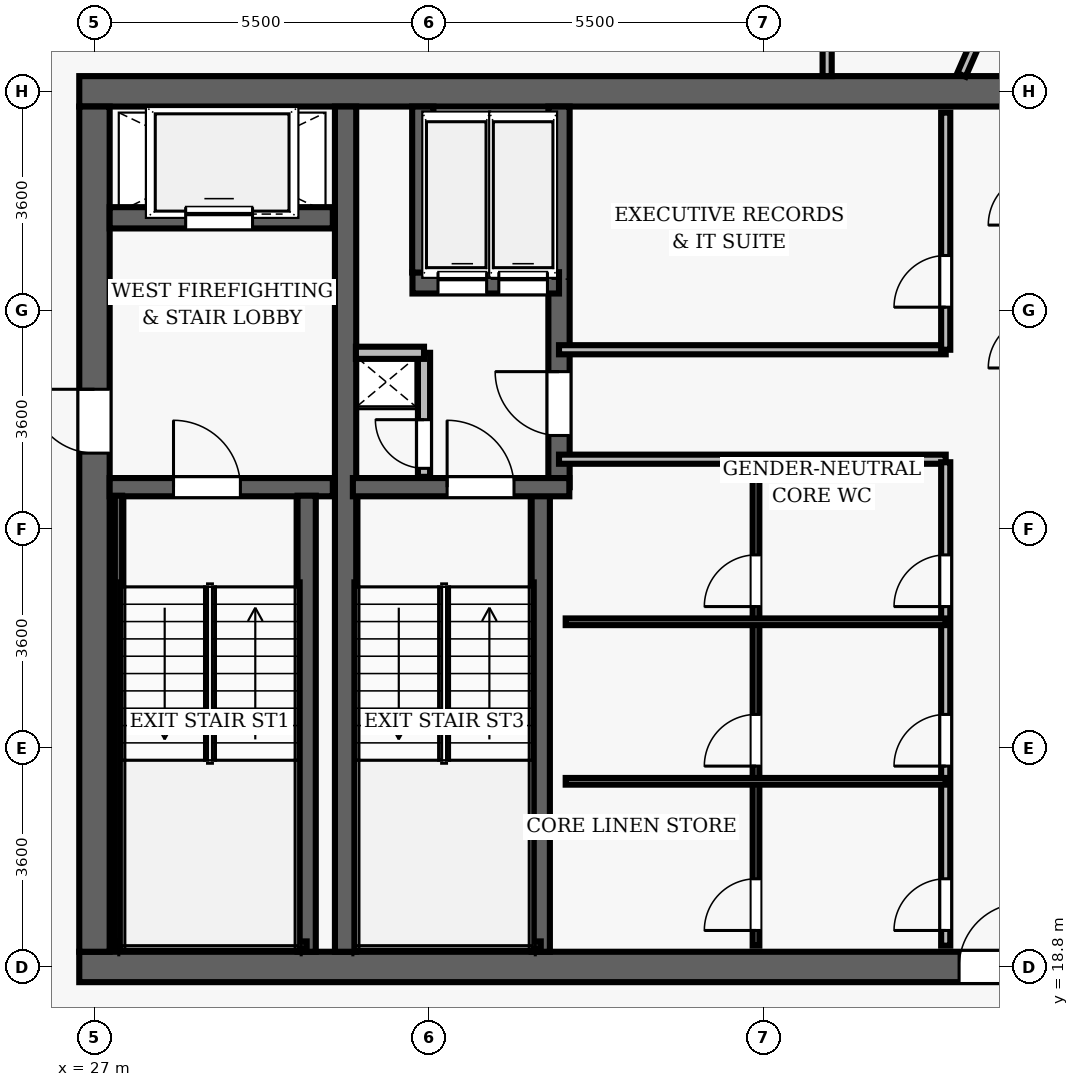
"""IFC4 building model, lengths in metres.
Left out: names, types, materials, properties, quantities, classifications, styles, units other than length and angle.
Written with IfcOpenShell. Run it as: python <this file> out.ifc"""

import sys

from ifc_helpers import new_model, si_unit, direction, frame, frame_2d, origin, place, context, subcontext, project, spatial, rectangle, extrude, element, fill, save


model = new_model("IFC4")
c1 = context("Model", 3, precision=1e-05, world=origin(), true_north=direction((0.0, 1.0)))
c2 = subcontext(c1, "Body", "Model", "MODEL_VIEW")
j1 = project(units=[si_unit("LENGTHUNIT", "METRE"), si_unit("PLANEANGLEUNIT", "RADIAN")], contexts=[c1])
p1 = place(None, origin())
s1 = spatial("IfcSite", under=j1, at=p1, CompositionType="ELEMENT")
p2 = place(p1, origin())
s2 = spatial("IfcBuilding", under=s1, at=p2, CompositionType="ELEMENT")
p3 = place(p2, frame((0.0, 0.0, 269.0)))
s3 = spatial("IfcBuildingStorey", under=s2, at=p3, CompositionType="ELEMENT", Elevation=269.0)
p4 = place(p3, frame((26.75, 18.8, 0.0), z_axis=(0.0, 0.0, 1.0), x_axis=(1.0, 0.0, 0.0)))
e1 = element("IfcWall", 1, at=p4, inside=s3, PredefinedType="SHEAR", context=c2, shape_type="SweptSolid", body=[
    extrude(rectangle(XDim=22.5, YDim=0.5, at=frame_2d((11.25, 0.0))), origin(), (0.0, 0.0, 1.0), 3.85),
])
p5 = place(p4, frame((14.47, 0.0, 0.0)))
e2 = element("IfcOpeningElement", 2, at=p5, cuts=e1, PredefinedType="OPENING", context=c2, shape_type="SweptSolid", body=[
    extrude(rectangle(XDim=1.05, YDim=2.15, at=frame_2d((0.525, 1.075))), frame((0.0, 0.26, 0.0), z_axis=(0.0, -1.0, 0.0), x_axis=(1.0, 0.0, 0.0)), (0.0, 0.0, 1.0), 0.52),
])
p6 = place(p3, frame((26.75, 33.2, 0.0), z_axis=(0.0, 0.0, 1.0), x_axis=(1.0, 0.0, 0.0)))
e3 = element("IfcWall", 3, at=p6, inside=s3, PredefinedType="SHEAR", context=c2, shape_type="SweptSolid", body=[
    extrude(rectangle(XDim=22.5, YDim=0.5, at=frame_2d((11.25, 0.0))), origin(), (0.0, 0.0, 1.0), 3.85),
])
p7 = place(p3, frame((27.0, 19.05, 0.0), z_axis=(0.0, 0.0, 1.0), x_axis=(0.0, 1.0, 0.0)))
e4 = element("IfcWall", 4, at=p7, inside=s3, PredefinedType="SHEAR", context=c2, shape_type="SweptSolid", body=[
    extrude(rectangle(XDim=13.9, YDim=0.5, at=frame_2d((6.95, 0.0))), origin(), (0.0, 0.0, 1.0), 3.85),
])
p8 = place(p7, frame((8.2, 0.0, 0.0)))
e5 = element("IfcOpeningElement", 5, at=p8, cuts=e4, PredefinedType="OPENING", context=c2, shape_type="SweptSolid", body=[
    extrude(rectangle(XDim=1.05, YDim=2.15, at=frame_2d((0.525, 1.075))), frame((0.0, 0.26, 0.0), z_axis=(0.0, -1.0, 0.0), x_axis=(1.0, 0.0, 0.0)), (0.0, 0.0, 1.0), 0.52),
])
p9 = place(p3, frame((31.13, 19.05, 0.0), z_axis=(0.0, 0.0, 1.0), x_axis=(0.0, 1.0, 0.0)))
e6 = element("IfcWall", 6, at=p9, inside=s3, PredefinedType="SHEAR", context=c2, shape_type="SweptSolid", body=[
    extrude(rectangle(XDim=13.9, YDim=0.35, at=frame_2d((6.95, 0.0))), origin(), (0.0, 0.0, 1.0), 3.85),
])
p10 = place(p3, frame((27.25, 26.69, 0.0), z_axis=(0.0, 0.0, 1.0), x_axis=(1.0, 0.0, 0.0)))
e7 = element("IfcWall", 7, at=p10, inside=s3, PredefinedType="SHEAR", context=c2, shape_type="SweptSolid", body=[
    extrude(rectangle(XDim=3.67, YDim=0.3, at=frame_2d((1.835, 0.0))), origin(), (0.0, 0.0, 1.0), 3.85),
])
p11 = place(p10, frame((1.05, 0.0, 0.0)))
e8 = element("IfcOpeningElement", 8, at=p11, cuts=e7, PredefinedType="OPENING", context=c2, shape_type="SweptSolid", body=[
    extrude(rectangle(XDim=1.1, YDim=2.15, at=frame_2d((0.55, 1.075))), frame((0.0, 0.16, 0.0), z_axis=(0.0, -1.0, 0.0), x_axis=(1.0, 0.0, 0.0)), (0.0, 0.0, 1.0), 0.32),
])
p12 = place(p3, frame((30.49, 19.05, 0.0), z_axis=(0.0, 0.0, 1.0), x_axis=(0.0, 1.0, 0.0)))
e9 = element("IfcWall", 9, at=p12, inside=s3, PredefinedType="SHEAR", context=c2, shape_type="SweptSolid", body=[
    extrude(rectangle(XDim=7.5, YDim=0.3, at=frame_2d((3.75, 0.0))), origin(), (0.0, 0.0, 1.0), 3.85),
])
p13 = place(p3, frame((27.395, 19.1, 0.0), z_axis=(0.0, 0.0, 1.0), x_axis=(0.0, 1.0, 0.0)))
e10 = element("IfcWall", 10, at=p13, inside=s3, PredefinedType="SHEAR", context=c2, shape_type="SweptSolid", body=[
    extrude(rectangle(XDim=7.45, YDim=0.12, at=frame_2d((3.725, 0.0))), origin(), (0.0, 0.0, 1.0), 3.85),
])
p14 = place(p3, frame((27.395, 19.16, 0.0), z_axis=(0.0, 0.0, 1.0), x_axis=(1.0, 0.0, 0.0)))
e11 = element("IfcWall", 11, at=p14, inside=s3, PredefinedType="SHEAR", context=c2, shape_type="SweptSolid", body=[
    extrude(rectangle(XDim=3.095, YDim=0.12, at=frame_2d((1.547, 0.0))), origin(), (0.0, 0.0, 1.0), 3.85),
])
p15 = place(p3, frame((27.25, 31.12, 0.0), z_axis=(0.0, 0.0, 1.0), x_axis=(1.0, 0.0, 0.0)))
e12 = element("IfcWall", 12, at=p15, inside=s3, PredefinedType="SHEAR", context=c2, shape_type="SweptSolid", body=[
    extrude(rectangle(XDim=3.67, YDim=0.35, at=frame_2d((1.835, 0.0))), origin(), (0.0, 0.0, 1.0), 3.04),
])
p16 = place(p15, frame((1.25, 0.0, 0.0)))
e13 = element("IfcOpeningElement", 13, at=p16, cuts=e12, PredefinedType="OPENING", context=c2, shape_type="SweptSolid", body=[
    extrude(rectangle(XDim=1.1, YDim=2.15, at=frame_2d((0.55, 1.075))), frame((0.0, 0.185, 0.0), z_axis=(0.0, -1.0, 0.0), x_axis=(1.0, 0.0, 0.0)), (0.0, 0.0, 1.0), 0.37),
])
p17 = place(p3, frame((34.34, 19.05, 0.0), z_axis=(0.0, 0.0, 1.0), x_axis=(0.0, 1.0, 0.0)))
e14 = element("IfcWall", 14, at=p17, inside=s3, PredefinedType="SHEAR", context=c2, shape_type="SweptSolid", body=[
    extrude(rectangle(XDim=7.5, YDim=0.3, at=frame_2d((3.75, 0.0))), origin(), (0.0, 0.0, 1.0), 3.85),
])
p18 = place(p3, frame((34.64, 26.69, 0.0), z_axis=(0.0, 0.0, 1.0), x_axis=(0.0, 1.0, 0.0)))
e15 = element("IfcWall", 15, at=p18, inside=s3, PredefinedType="SHEAR", context=c2, shape_type="SweptSolid", body=[
    extrude(rectangle(XDim=6.26, YDim=0.35, at=frame_2d((3.13, 0.0))), origin(), (0.0, 0.0, 1.0), 3.85),
])
p19 = place(p18, frame((0.85, 0.0, 0.0)))
e16 = element("IfcOpeningElement", 16, at=p19, cuts=e15, PredefinedType="OPENING", context=c2, shape_type="SweptSolid", body=[
    extrude(rectangle(XDim=1.05, YDim=2.15, at=frame_2d((0.525, 1.075))), frame((0.0, 0.185, 0.0), z_axis=(0.0, -1.0, 0.0), x_axis=(1.0, 0.0, 0.0)), (0.0, 0.0, 1.0), 0.37),
])
p20 = place(p3, frame((31.25, 26.69, 0.0), z_axis=(0.0, 0.0, 1.0), x_axis=(1.0, 0.0, 0.0)))
e17 = element("IfcWall", 17, at=p20, inside=s3, PredefinedType="SHEAR", context=c2, shape_type="SweptSolid", body=[
    extrude(rectangle(XDim=3.56, YDim=0.3, at=frame_2d((1.78, 0.0))), origin(), (0.0, 0.0, 1.0), 3.85),
])
p21 = place(p20, frame((1.55, 0.0, 0.0)))
e18 = element("IfcOpeningElement", 18, at=p21, cuts=e17, PredefinedType="OPENING", context=c2, shape_type="SweptSolid", body=[
    extrude(rectangle(XDim=1.1, YDim=2.15, at=frame_2d((0.55, 1.075))), frame((0.0, 0.16, 0.0), z_axis=(0.0, -1.0, 0.0), x_axis=(1.0, 0.0, 0.0)), (0.0, 0.0, 1.0), 0.32),
])
p22 = place(p3, frame((31.3, 19.16, 0.0), z_axis=(0.0, 0.0, 1.0), x_axis=(1.0, 0.0, 0.0)))
e19 = element("IfcWall", 19, at=p22, inside=s3, PredefinedType="SHEAR", context=c2, shape_type="SweptSolid", body=[
    extrude(rectangle(XDim=3.04, YDim=0.12, at=frame_2d((1.52, 0.0))), origin(), (0.0, 0.0, 1.0), 3.85),
])
p23 = place(p3, frame((32.23, 30.05, 0.0), z_axis=(0.0, 0.0, 1.0), x_axis=(1.0, 0.0, 0.0)))
e20 = element("IfcWall", 20, at=p23, inside=s3, PredefinedType="SHEAR", context=c2, shape_type="SweptSolid", body=[
    extrude(rectangle(XDim=2.41, YDim=0.35, at=frame_2d((1.205, 0.0))), origin(), (0.0, 0.0, 1.0), 3.04),
])
p24 = place(p23, frame((0.42, 0.0, 0.0)))
e21 = element("IfcOpeningElement", 21, at=p24, cuts=e20, PredefinedType="OPENING", context=c2, shape_type="SweptSolid", body=[
    extrude(rectangle(XDim=0.8, YDim=2.15, at=frame_2d((0.4, 1.075))), frame((0.0, 0.185, 0.0), z_axis=(0.0, -1.0, 0.0), x_axis=(1.0, 0.0, 0.0)), (0.0, 0.0, 1.0), 0.37),
])
p25 = place(p23, frame((1.42, 0.0, 0.0)))
e22 = element("IfcOpeningElement", 22, at=p25, cuts=e20, PredefinedType="OPENING", context=c2, shape_type="SweptSolid", body=[
    extrude(rectangle(XDim=0.8, YDim=2.15, at=frame_2d((0.4, 1.075))), frame((0.0, 0.185, 0.0), z_axis=(0.0, -1.0, 0.0), x_axis=(1.0, 0.0, 0.0)), (0.0, 0.0, 1.0), 0.37),
])
p26 = place(p3, frame((32.4, 30.22, 0.0), z_axis=(0.0, 0.0, 1.0), x_axis=(0.0, 1.0, 0.0)))
e23 = element("IfcWall", 23, at=p26, inside=s3, PredefinedType="SHEAR", context=c2, shape_type="SweptSolid", body=[
    extrude(rectangle(XDim=2.73, YDim=0.35, at=frame_2d((1.365, 0.0))), origin(), (0.0, 0.0, 1.0), 3.04),
])
p27 = place(p3, frame((32.42, 26.86, 0.0), z_axis=(0.0, 0.0, 1.0), x_axis=(0.0, 1.0, 0.0)))
e24 = element("IfcWall", 24, at=p27, inside=s3, PredefinedType="PARTITIONING", context=c2, shape_type="SweptSolid", body=[
    extrude(rectangle(XDim=2.04, YDim=0.2, at=frame_2d((1.02, 0.0))), origin(), (0.0, 0.0, 1.0), 3.04),
])
p28 = place(p27, frame((0.14, 0.0, 0.0)))
e25 = element("IfcOpeningElement", 25, at=p28, cuts=e24, PredefinedType="OPENING", context=c2, shape_type="SweptSolid", body=[
    extrude(rectangle(XDim=0.8, YDim=2.05, at=frame_2d((0.4, 1.025))), frame((0.0, 0.11, 0.0), z_axis=(0.0, -1.0, 0.0), x_axis=(1.0, 0.0, 0.0)), (0.0, 0.0, 1.0), 0.22),
])
p29 = place(p3, frame((31.3, 28.9, 0.0), z_axis=(0.0, 0.0, 1.0), x_axis=(1.0, 0.0, 0.0)))
e26 = element("IfcWall", 26, at=p29, inside=s3, PredefinedType="PARTITIONING", context=c2, shape_type="SweptSolid", body=[
    extrude(rectangle(XDim=1.12, YDim=0.2, at=frame_2d((0.56, 0.0))), origin(), (0.0, 0.0, 1.0), 3.04),
])
for number, where, z_axis, x_axis in (
    (27, (34.64, 27.15, 0.0), (0.0, 0.0, 1.0), (1.0, 0.0, 0.0)),
    (28, (34.64, 28.95, 0.0), (0.0, 0.0, 1.0), (1.0, 0.0, 0.0)),
):
    element("IfcWall", number, at=place(p3, frame(where, z_axis=z_axis, x_axis=x_axis)), inside=s3, PredefinedType="PARTITIONING", context=c2, shape_type="SweptSolid", body=[
        extrude(rectangle(XDim=6.36, YDim=0.15, at=frame_2d((3.18, 0.0))), origin(), (0.0, 0.0, 1.0), 3.04),
    ])
p30 = place(p3, frame((41.0, 28.95, 0.0), z_axis=(0.0, 0.0, 1.0), x_axis=(0.0, 1.0, 0.0)))
e29 = element("IfcWall", 29, at=p30, inside=s3, PredefinedType="PARTITIONING", context=c2, shape_type="SweptSolid", body=[
    extrude(rectangle(XDim=3.9, YDim=0.15, at=frame_2d((1.95, 0.0))), origin(), (0.0, 0.0, 1.0), 3.04),
])
p31 = place(p30, frame((0.7, 0.0, 0.0)))
e30 = element("IfcOpeningElement", 30, at=p31, cuts=e29, PredefinedType="OPENING", context=c2, shape_type="SweptSolid", body=[
    extrude(rectangle(XDim=0.85, YDim=2.1, at=frame_2d((0.425, 1.05))), frame((0.0, 0.085, 0.0), z_axis=(0.0, -1.0, 0.0), x_axis=(1.0, 0.0, 0.0)), (0.0, 0.0, 1.0), 0.17),
])
p32 = place(p3, frame((41.0, 19.15, 0.0), z_axis=(0.0, 0.0, 1.0), x_axis=(0.0, 1.0, 0.0)))
e31 = element("IfcWall", 31, at=p32, inside=s3, PredefinedType="PARTITIONING", context=c2, shape_type="SweptSolid", body=[
    extrude(rectangle(XDim=7.95, YDim=0.15, at=frame_2d((3.975, 0.0))), origin(), (0.0, 0.0, 1.0), 3.04),
])
p33 = place(p32, frame((0.25, 0.0, 0.0)))
e32 = element("IfcOpeningElement", 32, at=p33, cuts=e31, PredefinedType="OPENING", context=c2, shape_type="SweptSolid", body=[
    extrude(rectangle(XDim=0.85, YDim=2.1, at=frame_2d((0.425, 1.05))), frame((0.0, 0.085, 0.0), z_axis=(0.0, -1.0, 0.0), x_axis=(1.0, 0.0, 0.0)), (0.0, 0.0, 1.0), 0.17),
])
p34 = place(p32, frame((2.953, 0.0, 0.0)))
e33 = element("IfcOpeningElement", 33, at=p34, cuts=e31, PredefinedType="OPENING", context=c2, shape_type="SweptSolid", body=[
    extrude(rectangle(XDim=0.85, YDim=2.1, at=frame_2d((0.425, 1.05))), frame((0.0, 0.085, 0.0), z_axis=(0.0, -1.0, 0.0), x_axis=(1.0, 0.0, 0.0)), (0.0, 0.0, 1.0), 0.17),
])
p35 = place(p32, frame((5.576, 0.0, 0.0)))
e34 = element("IfcOpeningElement", 34, at=p35, cuts=e31, PredefinedType="OPENING", context=c2, shape_type="SweptSolid", body=[
    extrude(rectangle(XDim=0.85, YDim=2.1, at=frame_2d((0.425, 1.05))), frame((0.0, 0.085, 0.0), z_axis=(0.0, -1.0, 0.0), x_axis=(1.0, 0.0, 0.0)), (0.0, 0.0, 1.0), 0.17),
])
p36 = place(p3, frame((37.88, 19.15, 0.0), z_axis=(0.0, 0.0, 1.0), x_axis=(0.0, 1.0, 0.0)))
e35 = element("IfcWall", 35, at=p36, inside=s3, PredefinedType="PARTITIONING", context=c2, shape_type="SweptSolid", body=[
    extrude(rectangle(XDim=7.95, YDim=0.11, at=frame_2d((3.975, 0.0))), origin(), (0.0, 0.0, 1.0), 3.04),
])
p37 = place(p36, frame((0.25, 0.0, 0.0)))
e36 = element("IfcOpeningElement", 36, at=p37, cuts=e35, PredefinedType="OPENING", context=c2, shape_type="SweptSolid", body=[
    extrude(rectangle(XDim=0.85, YDim=2.1, at=frame_2d((0.425, 1.05))), frame((0.0, 0.065, 0.0), z_axis=(0.0, -1.0, 0.0), x_axis=(1.0, 0.0, 0.0)), (0.0, 0.0, 1.0), 0.13),
])
p38 = place(p36, frame((2.953, 0.0, 0.0)))
e37 = element("IfcOpeningElement", 37, at=p38, cuts=e35, PredefinedType="OPENING", context=c2, shape_type="SweptSolid", body=[
    extrude(rectangle(XDim=0.85, YDim=2.1, at=frame_2d((0.425, 1.05))), frame((0.0, 0.065, 0.0), z_axis=(0.0, -1.0, 0.0), x_axis=(1.0, 0.0, 0.0)), (0.0, 0.0, 1.0), 0.13),
])
p39 = place(p36, frame((5.576, 0.0, 0.0)))
e38 = element("IfcOpeningElement", 38, at=p39, cuts=e35, PredefinedType="OPENING", context=c2, shape_type="SweptSolid", body=[
    extrude(rectangle(XDim=0.85, YDim=2.1, at=frame_2d((0.425, 1.05))), frame((0.0, 0.065, 0.0), z_axis=(0.0, -1.0, 0.0), x_axis=(1.0, 0.0, 0.0)), (0.0, 0.0, 1.0), 0.13),
])
for number, where, z_axis, x_axis in (
    (39, (34.75, 21.853, 0.0), (0.0, 0.0, 1.0), (1.0, 0.0, 0.0)),
    (40, (34.75, 24.477, 0.0), (0.0, 0.0, 1.0), (1.0, 0.0, 0.0)),
):
    element("IfcWall", number, at=place(p3, frame(where, z_axis=z_axis, x_axis=x_axis)), inside=s3, PredefinedType="PARTITIONING", context=c2, shape_type="SweptSolid", body=[
        extrude(rectangle(XDim=6.25, YDim=0.11, at=frame_2d((3.125, 0.0))), origin(), (0.0, 0.0, 1.0), 3.04),
    ])
p40 = place(p3, frame((39.05, 33.45, 0.0), z_axis=(0.0, 0.0, 1.0), x_axis=(0.0, 1.0, 0.0)))
e41 = element("IfcWall", 41, at=p40, inside=s3, PredefinedType="PARTITIONING", context=c2, shape_type="SweptSolid", body=[
    extrude(rectangle(XDim=6.95, YDim=0.15, at=frame_2d((3.475, 0.0))), origin(), (0.0, 0.0, 1.0), 3.04),
])
p41 = place(p40, frame((0.988, 0.0, 0.0)))
e42 = element("IfcOpeningElement", 42, at=p41, cuts=e41, PredefinedType="OPENING", context=c2, shape_type="SweptSolid", body=[
    extrude(rectangle(XDim=1.5, YDim=2.2, at=frame_2d((0.75, 1.1))), frame((0.0, 0.085, 0.0), z_axis=(0.0, -1.0, 0.0), x_axis=(1.0, 0.0, 0.0)), (0.0, 0.0, 1.0), 0.17),
])
p42 = place(p3, frame((41.259, 33.47, 0.0), z_axis=(0.0, 0.0, 1.0), x_axis=(0.399896869604, 0.916560141879, 0.0)))
e43 = element("IfcWall", 43, at=p42, inside=s3, PredefinedType="PARTITIONING", context=c2, shape_type="SweptSolid", body=[
    extrude(rectangle(XDim=12.616, YDim=0.15, at=frame_2d((6.308, 0.0))), origin(), (0.0, 0.0, 1.0), 3.04),
])
p43 = place(p11, origin())
e44 = element("IfcDoor", 44, at=p43, inside=s3, OperationType="SINGLE_SWING_LEFT", PredefinedType="DOOR", context=c2, shape_type="SweptSolid", body=[
    extrude(rectangle(XDim=1.1, YDim=2.15, at=frame_2d((0.55, 1.075))), frame((0.0, 0.025, 0.0), z_axis=(0.0, -1.0, 0.0), x_axis=(1.0, 0.0, 0.0)), (0.0, 0.0, 1.0), 0.05),
])
fill(e8, e44)
p44 = place(p8, origin())
e45 = element("IfcDoor", 45, at=p44, inside=s3, OperationType="SINGLE_SWING_RIGHT", PredefinedType="DOOR", context=c2, shape_type="SweptSolid", body=[
    extrude(rectangle(XDim=1.05, YDim=2.15, at=frame_2d((0.525, 1.075))), frame((0.0, 0.025, 0.0), z_axis=(0.0, -1.0, 0.0), x_axis=(1.0, 0.0, 0.0)), (0.0, 0.0, 1.0), 0.05),
])
fill(e5, e45)
p45 = place(p21, origin())
e46 = element("IfcDoor", 46, at=p45, inside=s3, OperationType="SINGLE_SWING_LEFT", PredefinedType="DOOR", context=c2, shape_type="SweptSolid", body=[
    extrude(rectangle(XDim=1.1, YDim=2.15, at=frame_2d((0.55, 1.075))), frame((0.0, 0.025, 0.0), z_axis=(0.0, -1.0, 0.0), x_axis=(1.0, 0.0, 0.0)), (0.0, 0.0, 1.0), 0.05),
])
fill(e18, e46)
p46 = place(p28, origin())
e47 = element("IfcDoor", 47, at=p46, inside=s3, OperationType="SINGLE_SWING_RIGHT", PredefinedType="DOOR", context=c2, shape_type="SweptSolid", body=[
    extrude(rectangle(XDim=0.8, YDim=2.05, at=frame_2d((0.4, 1.025))), frame((0.0, 0.025, 0.0), z_axis=(0.0, -1.0, 0.0), x_axis=(1.0, 0.0, 0.0)), (0.0, 0.0, 1.0), 0.05),
])
fill(e25, e47)
p47 = place(p5, origin())
e48 = element("IfcDoor", 48, at=p47, inside=s3, OperationType="SINGLE_SWING_RIGHT", PredefinedType="DOOR", context=c2, shape_type="SweptSolid", body=[
    extrude(rectangle(XDim=1.05, YDim=2.15, at=frame_2d((0.525, 1.075))), frame((0.0, 0.025, 0.0), z_axis=(0.0, -1.0, 0.0), x_axis=(1.0, 0.0, 0.0)), (0.0, 0.0, 1.0), 0.05),
])
fill(e2, e48)
p48 = place(p19, origin())
e49 = element("IfcDoor", 49, at=p48, inside=s3, OperationType="SINGLE_SWING_RIGHT", PredefinedType="DOOR", context=c2, shape_type="SweptSolid", body=[
    extrude(rectangle(XDim=1.05, YDim=2.15, at=frame_2d((0.525, 1.075))), frame((0.0, 0.025, 0.0), z_axis=(0.0, -1.0, 0.0), x_axis=(1.0, 0.0, 0.0)), (0.0, 0.0, 1.0), 0.05),
])
fill(e16, e49)
p49 = place(p31, origin())
e50 = element("IfcDoor", 50, at=p49, inside=s3, OperationType="SINGLE_SWING_LEFT", PredefinedType="DOOR", context=c2, shape_type="SweptSolid", body=[
    extrude(rectangle(XDim=0.85, YDim=2.1, at=frame_2d((0.425, 1.05))), frame((0.0, 0.025, 0.0), z_axis=(0.0, -1.0, 0.0), x_axis=(1.0, 0.0, 0.0)), (0.0, 0.0, 1.0), 0.05),
])
fill(e30, e50)
p50 = place(p33, origin())
e51 = element("IfcDoor", 51, at=p50, inside=s3, OperationType="SINGLE_SWING_LEFT", PredefinedType="DOOR", context=c2, shape_type="SweptSolid", body=[
    extrude(rectangle(XDim=0.85, YDim=2.1, at=frame_2d((0.425, 1.05))), frame((0.0, 0.025, 0.0), z_axis=(0.0, -1.0, 0.0), x_axis=(1.0, 0.0, 0.0)), (0.0, 0.0, 1.0), 0.05),
])
fill(e32, e51)
p51 = place(p37, origin())
e52 = element("IfcDoor", 52, at=p51, inside=s3, OperationType="SINGLE_SWING_LEFT", PredefinedType="DOOR", context=c2, shape_type="SweptSolid", body=[
    extrude(rectangle(XDim=0.85, YDim=2.1, at=frame_2d((0.425, 1.05))), frame((0.0, 0.025, 0.0), z_axis=(0.0, -1.0, 0.0), x_axis=(1.0, 0.0, 0.0)), (0.0, 0.0, 1.0), 0.05),
])
fill(e36, e52)
p52 = place(p34, origin())
e53 = element("IfcDoor", 53, at=p52, inside=s3, OperationType="SINGLE_SWING_LEFT", PredefinedType="DOOR", context=c2, shape_type="SweptSolid", body=[
    extrude(rectangle(XDim=0.85, YDim=2.1, at=frame_2d((0.425, 1.05))), frame((0.0, 0.025, 0.0), z_axis=(0.0, -1.0, 0.0), x_axis=(1.0, 0.0, 0.0)), (0.0, 0.0, 1.0), 0.05),
])
fill(e33, e53)
p53 = place(p38, origin())
e54 = element("IfcDoor", 54, at=p53, inside=s3, OperationType="SINGLE_SWING_LEFT", PredefinedType="DOOR", context=c2, shape_type="SweptSolid", body=[
    extrude(rectangle(XDim=0.85, YDim=2.1, at=frame_2d((0.425, 1.05))), frame((0.0, 0.025, 0.0), z_axis=(0.0, -1.0, 0.0), x_axis=(1.0, 0.0, 0.0)), (0.0, 0.0, 1.0), 0.05),
])
fill(e37, e54)
p54 = place(p35, origin())
e55 = element("IfcDoor", 55, at=p54, inside=s3, OperationType="SINGLE_SWING_LEFT", PredefinedType="DOOR", context=c2, shape_type="SweptSolid", body=[
    extrude(rectangle(XDim=0.85, YDim=2.1, at=frame_2d((0.425, 1.05))), frame((0.0, 0.025, 0.0), z_axis=(0.0, -1.0, 0.0), x_axis=(1.0, 0.0, 0.0)), (0.0, 0.0, 1.0), 0.05),
])
fill(e34, e55)
p55 = place(p39, origin())
e56 = element("IfcDoor", 56, at=p55, inside=s3, OperationType="SINGLE_SWING_LEFT", PredefinedType="DOOR", context=c2, shape_type="SweptSolid", body=[
    extrude(rectangle(XDim=0.85, YDim=2.1, at=frame_2d((0.425, 1.05))), frame((0.0, 0.025, 0.0), z_axis=(0.0, -1.0, 0.0), x_axis=(1.0, 0.0, 0.0)), (0.0, 0.0, 1.0), 0.05),
])
fill(e38, e56)
p56 = place(p16, origin())
e57 = element("IfcDoor", 57, at=p56, inside=s3, OperationType="SLIDING_TO_LEFT", PredefinedType="DOOR", context=c2, shape_type="SweptSolid", body=[
    extrude(rectangle(XDim=1.1, YDim=2.15, at=frame_2d((0.55, 1.075))), frame((0.0, 0.025, 0.0), z_axis=(0.0, -1.0, 0.0), x_axis=(1.0, 0.0, 0.0)), (0.0, 0.0, 1.0), 0.05),
])
fill(e13, e57)
p57 = place(p24, origin())
e58 = element("IfcDoor", 58, at=p57, inside=s3, OperationType="SLIDING_TO_LEFT", PredefinedType="DOOR", context=c2, shape_type="SweptSolid", body=[
    extrude(rectangle(XDim=0.8, YDim=2.15, at=frame_2d((0.4, 1.075))), frame((0.0, 0.025, 0.0), z_axis=(0.0, -1.0, 0.0), x_axis=(1.0, 0.0, 0.0)), (0.0, 0.0, 1.0), 0.05),
])
fill(e21, e58)
p58 = place(p25, origin())
e59 = element("IfcDoor", 59, at=p58, inside=s3, OperationType="SLIDING_TO_LEFT", PredefinedType="DOOR", context=c2, shape_type="SweptSolid", body=[
    extrude(rectangle(XDim=0.8, YDim=2.15, at=frame_2d((0.4, 1.075))), frame((0.0, 0.025, 0.0), z_axis=(0.0, -1.0, 0.0), x_axis=(1.0, 0.0, 0.0)), (0.0, 0.0, 1.0), 0.05),
])
fill(e22, e59)
save(model, sys.argv[1])
